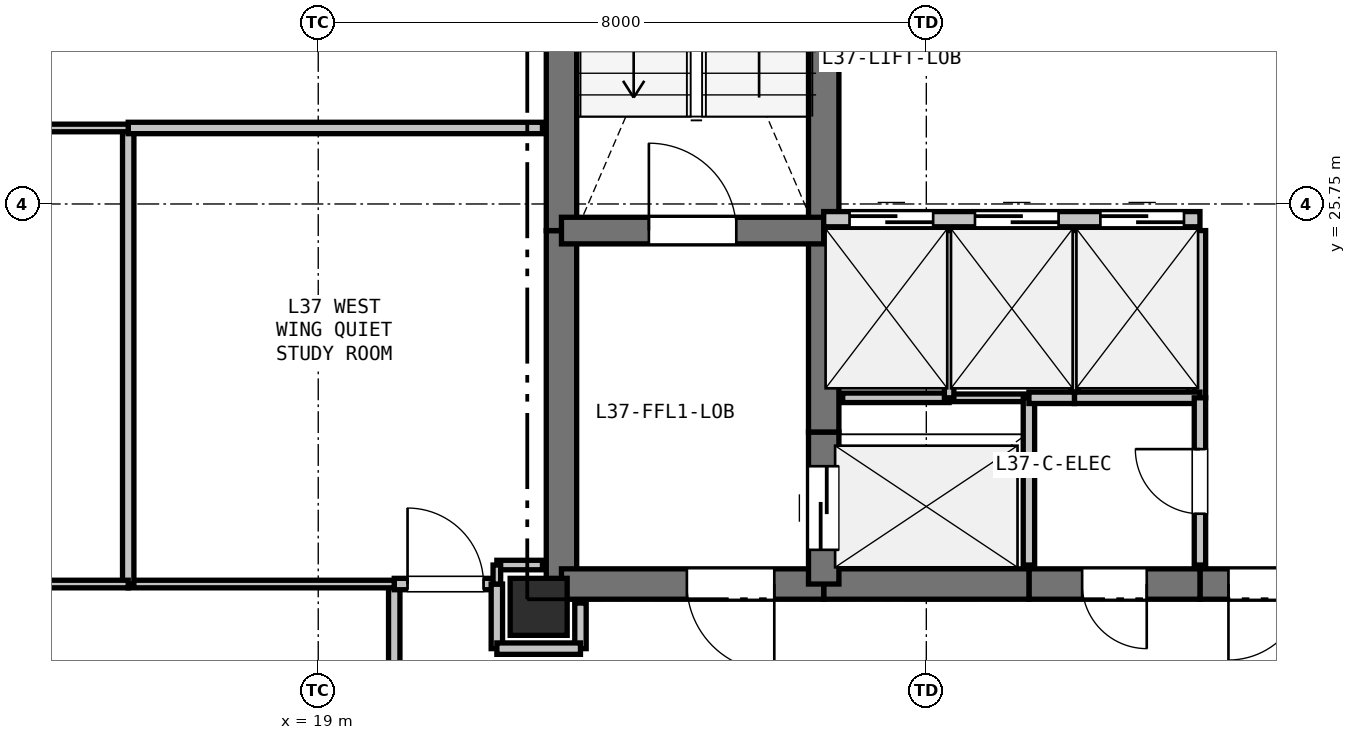
"""IFC4 building model, lengths in metres.
Left out: names, types, materials, properties, quantities, classifications, styles, units other than length and angle.
Written with IfcOpenShell. Run it as: python <this file> out.ifc"""

import sys

from ifc_helpers import new_model, si_unit, direction, frame, frame_2d, origin, origin_2d, place, context, subcontext, project, spatial, rectangle, extrude, element, fill, save


model = new_model("IFC4")
c1 = context("Model", 3, precision=1e-05, world=origin(), true_north=direction((0.0, 1.0)))
c2 = subcontext(c1, "Body", "Model", "MODEL_VIEW")
j1 = project(units=[si_unit("LENGTHUNIT", "METRE"), si_unit("PLANEANGLEUNIT", "RADIAN")], contexts=[c1])
p1 = place(None, origin())
s1 = spatial("IfcSite", under=j1, at=p1, CompositionType="ELEMENT")
p2 = place(p1, origin())
s2 = spatial("IfcBuilding", under=s1, at=p2, CompositionType="ELEMENT")
p3 = place(p2, frame((0.0, 0.0, 134.4)))
s3 = spatial("IfcBuildingStorey", under=s2, at=p3, CompositionType="ELEMENT", Elevation=134.4)
p4 = place(p3, frame((21.9, 20.45, 0.0), z_axis=(0.0, 0.0, 1.0), x_axis=(1.0, 0.0, 0.0)))
e1 = element("IfcColumn", 1, at=p4, inside=s3, PredefinedType="COLUMN", context=c2, shape_type="SweptSolid", body=[
    extrude(rectangle(XDim=0.75, YDim=0.75, at=origin_2d()), origin(), (0.0, 0.0, 1.0), 3.3),
])
p5 = place(p3, frame((16.378, 18.773, 0.0), z_axis=(0.0, 0.0, 1.0), x_axis=(-0.866027848477, 0.499995765644, 0.0)))
e2 = element("IfcWall", 2, at=p5, inside=s3, PredefinedType="SOLIDWALL", context=c2, shape_type="SweptSolid", body=[
    extrude(rectangle(XDim=11.186, YDim=0.25, at=frame_2d((5.593, 0.0))), origin(), (0.0, 0.0, 1.0), 2.68),
])
p6 = place(p5, frame((6.605, 0.0, 0.9)))
e3 = element("IfcOpeningElement", 3, at=p6, cuts=e2, PredefinedType="OPENING", context=c2, shape_type="SweptSolid", body=[
    extrude(rectangle(XDim=1.2, YDim=1.4, at=frame_2d((0.6, 0.7))), frame((0.0, 0.135, 0.0), z_axis=(0.0, -1.0, 0.0), x_axis=(1.0, 0.0, 0.0)), (0.0, 0.0, 1.0), 0.27),
])
p7 = place(p3, frame((22.2, 20.75, 0.0), z_axis=(0.0, 0.0, 1.0), x_axis=(0.0, 1.0, 0.0)))
e4 = element("IfcWall", 4, at=p7, inside=s3, PredefinedType="SHEAR", context=c2, shape_type="SweptSolid", body=[
    extrude(rectangle(XDim=4.65, YDim=0.4, at=frame_2d((2.325, 0.0))), origin(), (0.0, 0.0, 1.0), 3.06),
])
p8 = place(p3, frame((22.2, 25.4, 0.0), z_axis=(0.0, 0.0, 1.0), x_axis=(0.0, 1.0, 0.0)))
e5 = element("IfcWall", 5, at=p8, inside=s3, PredefinedType="SHEAR", context=c2, shape_type="SweptSolid", body=[
    extrude(rectangle(XDim=7.35, YDim=0.4, at=frame_2d((3.675, 0.0))), origin(), (0.0, 0.0, 1.0), 3.06),
])
p9 = place(p3, frame((32.35, 20.75, 0.0), z_axis=(0.0, 0.0, 1.0), x_axis=(-1.0, 0.0, 0.0)))
e6 = element("IfcWall", 6, at=p9, inside=s3, PredefinedType="SHEAR", context=c2, shape_type="SweptSolid", body=[
    extrude(rectangle(XDim=1.75, YDim=0.4, at=frame_2d((0.875, 0.0))), origin(), (0.0, 0.0, 1.0), 3.06),
])
p10 = place(p9, frame((0.375, 0.0, 0.0)))
e7 = element("IfcOpeningElement", 7, at=p10, cuts=e6, PredefinedType="OPENING", context=c2, shape_type="SweptSolid", body=[
    extrude(rectangle(XDim=1.0, YDim=2.15, at=frame_2d((0.5, 1.075))), frame((0.0, 0.21, 0.0), z_axis=(0.0, -1.0, 0.0), x_axis=(1.0, 0.0, 0.0)), (0.0, 0.0, 1.0), 0.42),
])
p11 = place(p3, frame((30.6, 20.75, 0.0), z_axis=(0.0, 0.0, 1.0), x_axis=(-1.0, 0.0, 0.0)))
e8 = element("IfcWall", 8, at=p11, inside=s3, PredefinedType="SHEAR", context=c2, shape_type="SweptSolid", body=[
    extrude(rectangle(XDim=2.25, YDim=0.4, at=frame_2d((1.125, 0.0))), origin(), (0.0, 0.0, 1.0), 3.06),
])
p12 = place(p11, frame((0.7, 0.0, 0.0)))
e9 = element("IfcOpeningElement", 9, at=p12, cuts=e8, PredefinedType="OPENING", context=c2, shape_type="SweptSolid", body=[
    extrude(rectangle(XDim=0.85, YDim=2.1, at=frame_2d((0.425, 1.05))), frame((0.0, 0.21, 0.0), z_axis=(0.0, -1.0, 0.0), x_axis=(1.0, 0.0, 0.0)), (0.0, 0.0, 1.0), 0.42),
])
p13 = place(p3, frame((28.35, 20.75, 0.0), z_axis=(0.0, 0.0, 1.0), x_axis=(-1.0, 0.0, 0.0)))
e10 = element("IfcWall", 10, at=p13, inside=s3, PredefinedType="SHEAR", context=c2, shape_type="SweptSolid", body=[
    extrude(rectangle(XDim=2.7, YDim=0.4, at=frame_2d((1.35, 0.0))), origin(), (0.0, 0.0, 1.0), 3.06),
])
p14 = place(p3, frame((25.65, 20.75, 0.0), z_axis=(0.0, 0.0, 1.0), x_axis=(-1.0, 0.0, 0.0)))
e11 = element("IfcWall", 11, at=p14, inside=s3, PredefinedType="SHEAR", context=c2, shape_type="SweptSolid", body=[
    extrude(rectangle(XDim=3.45, YDim=0.4, at=frame_2d((1.725, 0.0))), origin(), (0.0, 0.0, 1.0), 3.06),
])
p15 = place(p14, frame((0.65, 0.0, 0.0)))
e12 = element("IfcOpeningElement", 12, at=p15, cuts=e11, PredefinedType="OPENING", context=c2, shape_type="SweptSolid", body=[
    extrude(rectangle(XDim=1.15, YDim=2.15, at=frame_2d((0.575, 1.075))), frame((0.0, 0.21, 0.0), z_axis=(0.0, -1.0, 0.0), x_axis=(1.0, 0.0, 0.0)), (0.0, 0.0, 1.0), 0.42),
])
p16 = place(p3, frame((25.65, 20.75, 0.0), z_axis=(0.0, 0.0, 1.0), x_axis=(0.0, 1.0, 0.0)))
e13 = element("IfcWall", 13, at=p16, inside=s3, PredefinedType="SHEAR", context=c2, shape_type="SweptSolid", body=[
    extrude(rectangle(XDim=2.0, YDim=0.4, at=frame_2d((1.0, 0.0))), origin(), (0.0, 0.0, 1.0), 3.06),
])
p17 = place(p16, frame((0.45, 0.0, 0.0)))
e14 = element("IfcOpeningElement", 14, at=p17, cuts=e13, PredefinedType="OPENING", context=c2, shape_type="SweptSolid", body=[
    extrude(rectangle(XDim=1.1, YDim=2.15, at=frame_2d((0.55, 1.075))), frame((0.0, 0.21, 0.0), z_axis=(0.0, -1.0, 0.0), x_axis=(1.0, 0.0, 0.0)), (0.0, 0.0, 1.0), 0.42),
])
p18 = place(p3, frame((25.65, 22.75, 0.0), z_axis=(0.0, 0.0, 1.0), x_axis=(0.0, 1.0, 0.0)))
e15 = element("IfcWall", 15, at=p18, inside=s3, PredefinedType="SHEAR", context=c2, shape_type="SweptSolid", body=[
    extrude(rectangle(XDim=2.8, YDim=0.4, at=frame_2d((1.4, 0.0))), origin(), (0.0, 0.0, 1.0), 3.06),
])
p19 = place(p3, frame((25.65, 25.55, 0.0), z_axis=(0.0, 0.0, 1.0), x_axis=(0.0, 1.0, 0.0)))
e16 = element("IfcWall", 16, at=p19, inside=s3, PredefinedType="SHEAR", context=c2, shape_type="SweptSolid", body=[
    extrude(rectangle(XDim=2.4, YDim=0.4, at=frame_2d((1.2, 0.0))), origin(), (0.0, 0.0, 1.0), 3.06),
])
p20 = place(p3, frame((22.2, 25.4, 0.0), z_axis=(0.0, 0.0, 1.0), x_axis=(1.0, 0.0, 0.0)))
e17 = element("IfcWall", 17, at=p20, inside=s3, PredefinedType="SHEAR", context=c2, shape_type="SweptSolid", body=[
    extrude(rectangle(XDim=3.45, YDim=0.35, at=frame_2d((1.725, 0.0))), origin(), (0.0, 0.0, 1.0), 3.06),
])
p21 = place(p20, frame((1.15, 0.0, 0.0)))
e18 = element("IfcOpeningElement", 18, at=p21, cuts=e17, PredefinedType="OPENING", context=c2, shape_type="SweptSolid", body=[
    extrude(rectangle(XDim=1.15, YDim=2.15, at=frame_2d((0.575, 1.075))), frame((0.0, 0.185, 0.0), z_axis=(0.0, -1.0, 0.0), x_axis=(1.0, 0.0, 0.0)), (0.0, 0.0, 1.0), 0.37),
])
p22 = place(p3, frame((25.65, 25.55, 0.0), z_axis=(0.0, 0.0, 1.0), x_axis=(1.0, 0.0, 0.0)))
e19 = element("IfcWall", 19, at=p22, inside=s3, PredefinedType="PARTITIONING", context=c2, shape_type="SweptSolid", body=[
    extrude(rectangle(XDim=4.95, YDim=0.2, at=frame_2d((2.475, 0.0))), origin(), (0.0, 0.0, 1.0), 3.06),
])
p23 = place(p22, frame((0.34, 0.0, 0.0)))
e20 = element("IfcOpeningElement", 20, at=p23, cuts=e19, PredefinedType="OPENING", context=c2, shape_type="SweptSolid", body=[
    extrude(rectangle(XDim=1.1, YDim=2.15, at=frame_2d((0.55, 1.075))), frame((0.0, 0.11, 0.0), z_axis=(0.0, -1.0, 0.0), x_axis=(1.0, 0.0, 0.0)), (0.0, 0.0, 1.0), 0.22),
])
p24 = place(p22, frame((1.99, 0.0, 0.0)))
e21 = element("IfcOpeningElement", 21, at=p24, cuts=e19, PredefinedType="OPENING", context=c2, shape_type="SweptSolid", body=[
    extrude(rectangle(XDim=1.1, YDim=2.15, at=frame_2d((0.55, 1.075))), frame((0.0, 0.11, 0.0), z_axis=(0.0, -1.0, 0.0), x_axis=(1.0, 0.0, 0.0)), (0.0, 0.0, 1.0), 0.22),
])
p25 = place(p22, frame((3.64, 0.0, 0.0)))
e22 = element("IfcOpeningElement", 22, at=p25, cuts=e19, PredefinedType="OPENING", context=c2, shape_type="SweptSolid", body=[
    extrude(rectangle(XDim=1.1, YDim=2.15, at=frame_2d((0.55, 1.075))), frame((0.0, 0.11, 0.0), z_axis=(0.0, -1.0, 0.0), x_axis=(1.0, 0.0, 0.0)), (0.0, 0.0, 1.0), 0.22),
])
p26 = place(p3, frame((25.9, 23.2, 0.0), z_axis=(0.0, 0.0, 1.0), x_axis=(1.0, 0.0, 0.0)))
e23 = element("IfcWall", 23, at=p26, inside=s3, PredefinedType="PARTITIONING", context=c2, shape_type="SweptSolid", body=[
    extrude(rectangle(XDim=1.4, YDim=0.125, at=frame_2d((0.7, 0.0))), origin(), (0.0, 0.0, 1.0), 3.06),
])
p27 = place(p3, frame((27.3, 23.2, 0.0), z_axis=(0.0, 0.0, 1.0), x_axis=(1.0, 0.0, 0.0)))
e24 = element("IfcWall", 24, at=p27, inside=s3, PredefinedType="PARTITIONING", context=c2, shape_type="SweptSolid", body=[
    extrude(rectangle(XDim=1.05, YDim=0.1, at=frame_2d((0.525, 0.0))), origin(), (0.0, 0.0, 1.0), 3.06),
])
p28 = place(p3, frame((28.35, 23.2, 0.0), z_axis=(0.0, 0.0, 1.0), x_axis=(0.0, -1.0, 0.0)))
e25 = element("IfcWall", 25, at=p28, inside=s3, PredefinedType="PARTITIONING", context=c2, shape_type="SweptSolid", body=[
    extrude(rectangle(XDim=2.2, YDim=0.15, at=frame_2d((1.1, 0.0))), origin(), (0.0, 0.0, 1.0), 3.06),
])
p29 = place(p3, frame((27.3, 25.4, 0.0), z_axis=(0.0, 0.0, 1.0), x_axis=(0.0, -1.0, 0.0)))
e26 = element("IfcWall", 26, at=p29, inside=s3, PredefinedType="PARTITIONING", context=c2, shape_type="SweptSolid", body=[
    extrude(rectangle(XDim=2.2, YDim=0.125, at=frame_2d((1.1, 0.0))), origin(), (0.0, 0.0, 1.0), 3.06),
])
p30 = place(p3, frame((28.95, 25.4, 0.0), z_axis=(0.0, 0.0, 1.0), x_axis=(0.0, -1.0, 0.0)))
e27 = element("IfcWall", 27, at=p30, inside=s3, PredefinedType="PARTITIONING", context=c2, shape_type="SweptSolid", body=[
    extrude(rectangle(XDim=2.2, YDim=0.1, at=frame_2d((1.1, 0.0))), origin(), (0.0, 0.0, 1.0), 3.06),
])
p31 = place(p3, frame((28.95, 23.2, 0.0), z_axis=(0.0, 0.0, 1.0), x_axis=(-1.0, 0.0, 0.0)))
e28 = element("IfcWall", 28, at=p31, inside=s3, PredefinedType="PARTITIONING", context=c2, shape_type="SweptSolid", body=[
    extrude(rectangle(XDim=0.6, YDim=0.15, at=frame_2d((0.3, 0.0))), origin(), (0.0, 0.0, 1.0), 3.06),
])
p32 = place(p3, frame((30.6, 25.4, 0.0), z_axis=(0.0, 0.0, 1.0), x_axis=(0.0, -1.0, 0.0)))
e29 = element("IfcWall", 29, at=p32, inside=s3, PredefinedType="PARTITIONING", context=c2, shape_type="SweptSolid", body=[
    extrude(rectangle(XDim=2.2, YDim=0.15, at=frame_2d((1.1, 0.0))), origin(), (0.0, 0.0, 1.0), 3.06),
])
p33 = place(p3, frame((30.6, 23.2, 0.0), z_axis=(0.0, 0.0, 1.0), x_axis=(-1.0, 0.0, 0.0)))
e30 = element("IfcWall", 30, at=p33, inside=s3, PredefinedType="PARTITIONING", context=c2, shape_type="SweptSolid", body=[
    extrude(rectangle(XDim=1.65, YDim=0.15, at=frame_2d((0.825, 0.0))), origin(), (0.0, 0.0, 1.0), 3.06),
])
p34 = place(p3, frame((30.6, 21.0, 0.0), z_axis=(0.0, 0.0, 1.0), x_axis=(0.0, 1.0, 0.0)))
e31 = element("IfcWall", 31, at=p34, inside=s3, PredefinedType="PARTITIONING", context=c2, shape_type="SweptSolid", body=[
    extrude(rectangle(XDim=2.2, YDim=0.15, at=frame_2d((1.1, 0.0))), origin(), (0.0, 0.0, 1.0), 3.06),
])
p35 = place(p34, frame((0.675, 0.0, 0.0)))
e32 = element("IfcOpeningElement", 32, at=p35, cuts=e31, PredefinedType="OPENING", context=c2, shape_type="SweptSolid", body=[
    extrude(rectangle(XDim=0.85, YDim=2.1, at=frame_2d((0.425, 1.05))), frame((0.0, 0.085, 0.0), z_axis=(0.0, -1.0, 0.0), x_axis=(1.0, 0.0, 0.0)), (0.0, 0.0, 1.0), 0.17),
])
p36 = place(p3, frame((22.45, 19.9, 0.0), z_axis=(0.0, 0.0, 1.0), x_axis=(0.0, 1.0, 0.0)))
e33 = element("IfcWall", 33, at=p36, inside=s3, PredefinedType="PARTITIONING", context=c2, shape_type="SweptSolid", body=[
    extrude(rectangle(XDim=0.6, YDim=0.15, at=frame_2d((0.3, 0.0))), origin(), (0.0, 0.0, 1.0), 2.433),
])
p37 = place(p3, frame((20.0, 18.15, 0.0), z_axis=(0.0, 0.0, 1.0), x_axis=(0.0, 1.0, 0.0)))
e34 = element("IfcWall", 34, at=p37, inside=s3, PredefinedType="PARTITIONING", context=c2, shape_type="SweptSolid", body=[
    extrude(rectangle(XDim=2.6, YDim=0.15, at=frame_2d((1.3, 0.0))), origin(), (0.0, 0.0, 1.0), 3.06),
])
p38 = place(p3, frame((20.0, 20.75, 0.0), z_axis=(0.0, 0.0, 1.0), x_axis=(1.0, 0.0, 0.0)))
e35 = element("IfcWall", 35, at=p38, inside=s3, PredefinedType="PARTITIONING", context=c2, shape_type="SweptSolid", body=[
    extrude(rectangle(XDim=1.35, YDim=0.15, at=frame_2d((0.675, 0.0))), origin(), (0.0, 0.0, 1.0), 2.433),
])
p39 = place(p38, frame((0.175, 0.0, 0.0)))
e36 = element("IfcOpeningElement", 36, at=p39, cuts=e35, PredefinedType="OPENING", context=c2, shape_type="SweptSolid", body=[
    extrude(rectangle(XDim=1.0, YDim=2.15, at=frame_2d((0.5, 1.075))), frame((0.0, 0.085, 0.0), z_axis=(0.0, -1.0, 0.0), x_axis=(1.0, 0.0, 0.0)), (0.0, 0.0, 1.0), 0.17),
])
p40 = place(p3, frame((21.35, 20.75, 0.0), z_axis=(0.0, 0.0, 1.0), x_axis=(0.0, -1.0, 0.0)))
e37 = element("IfcWall", 37, at=p40, inside=s3, PredefinedType="PARTITIONING", context=c2, shape_type="SweptSolid", body=[
    extrude(rectangle(XDim=0.85, YDim=0.15, at=frame_2d((0.425, 0.0))), origin(), (0.0, 0.0, 1.0), 2.433),
])
p41 = place(p3, frame((21.35, 19.9, 0.0), z_axis=(0.0, 0.0, 1.0), x_axis=(1.0, 0.0, 0.0)))
e38 = element("IfcWall", 38, at=p41, inside=s3, PredefinedType="PARTITIONING", context=c2, shape_type="SweptSolid", body=[
    extrude(rectangle(XDim=1.1, YDim=0.15, at=frame_2d((0.55, 0.0))), origin(), (0.0, 0.0, 1.0), 2.433),
])
p42 = place(p3, frame((20.0, 20.75, 0.0), z_axis=(0.0, 0.0, 1.0), x_axis=(-1.0, 0.0, 0.0)))
e39 = element("IfcWall", 39, at=p42, inside=s3, PredefinedType="PARTITIONING", context=c2, shape_type="SweptSolid", body=[
    extrude(rectangle(XDim=3.5, YDim=0.1, at=frame_2d((1.75, 0.0))), origin(), (0.0, 0.0, 1.0), 3.06),
])
p43 = place(p3, frame((16.5, 20.75, 0.0), z_axis=(0.0, 0.0, 1.0), x_axis=(0.0, 1.0, 0.0)))
e40 = element("IfcWall", 40, at=p43, inside=s3, PredefinedType="PARTITIONING", context=c2, shape_type="SweptSolid", body=[
    extrude(rectangle(XDim=6.0, YDim=0.15, at=frame_2d((3.0, 0.0))), origin(), (0.0, 0.0, 1.0), 2.433),
])
p44 = place(p3, frame((16.5, 26.75, 0.0), z_axis=(0.0, 0.0, 1.0), x_axis=(1.0, 0.0, 0.0)))
e41 = element("IfcWall", 41, at=p44, inside=s3, PredefinedType="PARTITIONING", context=c2, shape_type="SweptSolid", body=[
    extrude(rectangle(XDim=5.45, YDim=0.15, at=frame_2d((2.725, 0.0))), origin(), (0.0, 0.0, 1.0), 2.508),
])
p45 = place(p3, frame((21.95, 21.0, 0.0), z_axis=(0.0, 0.0, 1.0), x_axis=(-1.0, 0.0, 0.0)))
e42 = element("IfcWall", 42, at=p45, inside=s3, PredefinedType="PARTITIONING", context=c2, shape_type="SweptSolid", body=[
    extrude(rectangle(XDim=0.6, YDim=0.125, at=frame_2d((0.3, 0.0))), origin(), (0.0, 0.0, 1.0), 2.508),
])
p46 = place(p3, frame((21.35, 21.0, 0.0), z_axis=(0.0, 0.0, 1.0), x_axis=(0.0, -1.0, 0.0)))
e43 = element("IfcWall", 43, at=p46, inside=s3, PredefinedType="PARTITIONING", context=c2, shape_type="SweptSolid", body=[
    extrude(rectangle(XDim=0.25, YDim=0.1, at=frame_2d((0.125, 0.0))), origin(), (0.0, 0.0, 1.0), 3.06),
])
p47 = place(p3, frame((16.5, 26.75, 0.0), z_axis=(0.0, 0.0, 1.0), x_axis=(-1.0, 0.0, 0.0)))
e44 = element("IfcWall", 44, at=p47, inside=s3, PredefinedType="PARTITIONING", context=c2, shape_type="SweptSolid", body=[
    extrude(rectangle(XDim=9.791, YDim=0.1, at=frame_2d((4.896, 0.0))), origin(), (0.0, 0.0, 1.0), 2.725),
])
p48 = place(p47, frame((4.42, 0.0, 0.0)))
e45 = element("IfcOpeningElement", 45, at=p48, cuts=e44, PredefinedType="OPENING", context=c2, shape_type="SweptSolid", body=[
    extrude(rectangle(XDim=0.95, YDim=2.1, at=frame_2d((0.475, 1.05))), frame((0.0, 0.06, 0.0), z_axis=(0.0, -1.0, 0.0), x_axis=(1.0, 0.0, 0.0)), (0.0, 0.0, 1.0), 0.12),
])
p49 = place(p3, frame((16.5, 20.75, 0.0), z_axis=(0.0, 0.0, 1.0), x_axis=(-1.0, 0.0, 0.0)))
e46 = element("IfcWall", 46, at=p49, inside=s3, PredefinedType="PARTITIONING", context=c2, shape_type="SweptSolid", body=[
    extrude(rectangle(XDim=3.275, YDim=0.1, at=frame_2d((1.638, 0.0))), origin(), (0.0, 0.0, 1.0), 2.365),
])
p50 = place(p23, origin())
e47 = element("IfcDoor", 47, at=p50, inside=s3, OperationType="SLIDING_TO_LEFT", PredefinedType="DOOR", context=c2, shape_type="SweptSolid", body=[
    extrude(rectangle(XDim=1.1, YDim=2.15, at=frame_2d((0.55, 1.075))), frame((0.0, 0.025, 0.0), z_axis=(0.0, -1.0, 0.0), x_axis=(1.0, 0.0, 0.0)), (0.0, 0.0, 1.0), 0.05),
])
fill(e20, e47)
p51 = place(p24, origin())
e48 = element("IfcDoor", 48, at=p51, inside=s3, OperationType="SLIDING_TO_LEFT", PredefinedType="DOOR", context=c2, shape_type="SweptSolid", body=[
    extrude(rectangle(XDim=1.1, YDim=2.15, at=frame_2d((0.55, 1.075))), frame((0.0, 0.025, 0.0), z_axis=(0.0, -1.0, 0.0), x_axis=(1.0, 0.0, 0.0)), (0.0, 0.0, 1.0), 0.05),
])
fill(e21, e48)
p52 = place(p25, origin())
e49 = element("IfcDoor", 49, at=p52, inside=s3, OperationType="SLIDING_TO_LEFT", PredefinedType="DOOR", context=c2, shape_type="SweptSolid", body=[
    extrude(rectangle(XDim=1.1, YDim=2.15, at=frame_2d((0.55, 1.075))), frame((0.0, 0.025, 0.0), z_axis=(0.0, -1.0, 0.0), x_axis=(1.0, 0.0, 0.0)), (0.0, 0.0, 1.0), 0.05),
])
fill(e22, e49)
p53 = place(p10, origin())
e50 = element("IfcDoor", 50, at=p53, inside=s3, OperationType="SINGLE_SWING_RIGHT", PredefinedType="DOOR", context=c2, shape_type="SweptSolid", body=[
    extrude(rectangle(XDim=1.0, YDim=2.15, at=frame_2d((0.5, 1.075))), frame((0.0, 0.025, 0.0), z_axis=(0.0, -1.0, 0.0), x_axis=(1.0, 0.0, 0.0)), (0.0, 0.0, 1.0), 0.05),
])
fill(e7, e50)
p54 = place(p17, origin())
e51 = element("IfcDoor", 51, at=p54, inside=s3, OperationType="SLIDING_TO_LEFT", PredefinedType="DOOR", context=c2, shape_type="SweptSolid", body=[
    extrude(rectangle(XDim=1.1, YDim=2.15, at=frame_2d((0.55, 1.075))), frame((0.0, 0.025, 0.0), z_axis=(0.0, -1.0, 0.0), x_axis=(1.0, 0.0, 0.0)), (0.0, 0.0, 1.0), 0.05),
])
fill(e14, e51)
p55 = place(p21, origin())
e52 = element("IfcDoor", 52, at=p55, inside=s3, OperationType="SINGLE_SWING_LEFT", PredefinedType="DOOR", context=c2, shape_type="SweptSolid", body=[
    extrude(rectangle(XDim=1.15, YDim=2.15, at=frame_2d((0.575, 1.075))), frame((0.0, 0.025, 0.0), z_axis=(0.0, -1.0, 0.0), x_axis=(1.0, 0.0, 0.0)), (0.0, 0.0, 1.0), 0.05),
])
fill(e18, e52)
p56 = place(p15, origin())
e53 = element("IfcDoor", 53, at=p56, inside=s3, OperationType="SINGLE_SWING_LEFT", PredefinedType="DOOR", context=c2, shape_type="SweptSolid", body=[
    extrude(rectangle(XDim=1.15, YDim=2.15, at=frame_2d((0.575, 1.075))), frame((0.0, 0.025, 0.0), z_axis=(0.0, -1.0, 0.0), x_axis=(1.0, 0.0, 0.0)), (0.0, 0.0, 1.0), 0.05),
])
fill(e12, e53)
p57 = place(p35, origin())
e54 = element("IfcDoor", 54, at=p57, inside=s3, OperationType="SINGLE_SWING_RIGHT", PredefinedType="DOOR", context=c2, shape_type="SweptSolid", body=[
    extrude(rectangle(XDim=0.85, YDim=2.1, at=frame_2d((0.425, 1.05))), frame((0.0, 0.025, 0.0), z_axis=(0.0, -1.0, 0.0), x_axis=(1.0, 0.0, 0.0)), (0.0, 0.0, 1.0), 0.05),
])
fill(e32, e54)
p58 = place(p12, origin())
e55 = element("IfcDoor", 55, at=p58, inside=s3, OperationType="SINGLE_SWING_LEFT", PredefinedType="DOOR", context=c2, shape_type="SweptSolid", body=[
    extrude(rectangle(XDim=0.85, YDim=2.1, at=frame_2d((0.425, 1.05))), frame((0.0, 0.025, 0.0), z_axis=(0.0, -1.0, 0.0), x_axis=(1.0, 0.0, 0.0)), (0.0, 0.0, 1.0), 0.05),
])
fill(e9, e55)
p59 = place(p39, origin())
e56 = element("IfcDoor", 56, at=p59, inside=s3, OperationType="SINGLE_SWING_LEFT", PredefinedType="DOOR", context=c2, shape_type="SweptSolid", body=[
    extrude(rectangle(XDim=1.0, YDim=2.15, at=frame_2d((0.5, 1.075))), frame((0.0, 0.025, 0.0), z_axis=(0.0, -1.0, 0.0), x_axis=(1.0, 0.0, 0.0)), (0.0, 0.0, 1.0), 0.05),
])
fill(e36, e56)
save(model, sys.argv[1])
